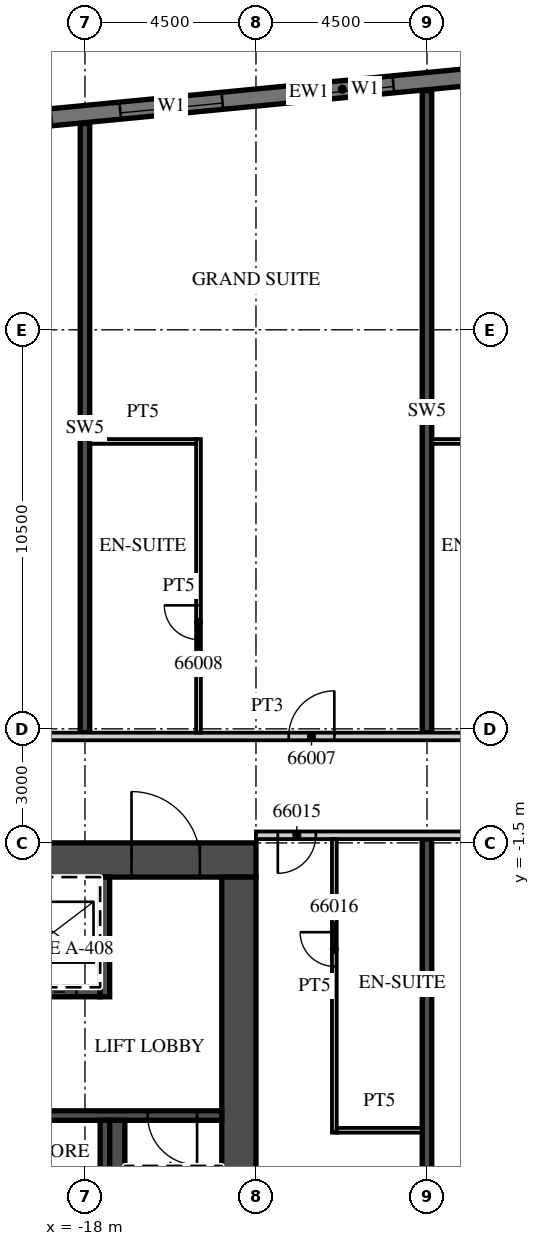
"""IFC4 building model, lengths in metres.
Left out: names, types, materials, properties, quantities, classifications, styles, units other than length and angle.
Written with IfcOpenShell. Run it as: python <this file> out.ifc"""

import sys

from ifc_helpers import new_model, si_unit, direction, frame, frame_2d, origin, place, context, subcontext, project, spatial, rectangle, extrude, element, fill, save


model = new_model("IFC4")
c1 = context("Model", 3, precision=1e-05, world=origin(), true_north=direction((0.0, 1.0)))
c2 = subcontext(c1, "Body", "Model", "MODEL_VIEW")
j1 = project(units=[si_unit("LENGTHUNIT", "METRE"), si_unit("PLANEANGLEUNIT", "RADIAN")], contexts=[c1])
p1 = place(None, origin())
s1 = spatial("IfcSite", under=j1, at=p1, CompositionType="ELEMENT")
p2 = place(p1, origin())
s2 = spatial("IfcBuilding", under=s1, at=p2, CompositionType="ELEMENT")
p3 = place(p2, frame((0.0, 0.0, 268.5)))
s3 = spatial("IfcBuildingStorey", under=s2, at=p3, CompositionType="ELEMENT", Elevation=268.5)
p4 = place(p3, frame((-18.0, 1.4, 0.0), z_axis=(0.0, 0.0, 1.0), x_axis=(0.0, 1.0, 0.0)))
e1 = element("IfcWall", 1, at=p4, inside=s3, PredefinedType="SHEAR", context=c2, shape_type="SweptSolid", body=[
    extrude(rectangle(XDim=16.03, YDim=0.25, at=frame_2d((8.015, 0.0))), origin(), (0.0, 0.0, 1.0), 3.3),
])
p5 = place(p3, frame((-9.0, -20.94, 0.0), z_axis=(0.0, 0.0, 1.0), x_axis=(0.0, 1.0, 0.0)))
e2 = element("IfcWall", 2, at=p5, inside=s3, PredefinedType="SHEAR", context=c2, shape_type="SweptSolid", body=[
    extrude(rectangle(XDim=19.541, YDim=0.25, at=frame_2d((9.77, 0.0))), origin(), (0.0, 0.0, 1.0), 3.3),
])
p6 = place(p3, frame((-9.0, 1.4, 0.0), z_axis=(0.0, 0.0, 1.0), x_axis=(0.0, 1.0, 0.0)))
e3 = element("IfcWall", 3, at=p6, inside=s3, PredefinedType="SHEAR", context=c2, shape_type="SweptSolid", body=[
    extrude(rectangle(XDim=16.896, YDim=0.25, at=frame_2d((8.448, 0.0))), origin(), (0.0, 0.0, 1.0), 3.3),
])
p7 = place(p3, frame((13.521, 20.713, 0.0), z_axis=(0.0, 0.0, 1.0), x_axis=(-0.995396277313, -0.095844932638, 0.0)))
e4 = element("IfcWall", 4, at=p7, inside=s3, PredefinedType="SOLIDWALL", context=c2, shape_type="SweptSolid", body=[
    extrude(rectangle(XDim=51.495, YDim=0.45, at=frame_2d((25.748, 0.0))), origin(), (0.0, 0.0, 1.0), 3.02),
])
p8 = place(p7, frame((0.91, 0.0, 0.45)))
e5 = element("IfcOpeningElement", 5, at=p8, cuts=e4, PredefinedType="OPENING", context=c2, shape_type="SweptSolid", body=[
    extrude(rectangle(XDim=2.7, YDim=2.25, at=frame_2d((1.35, 1.125))), frame((0.0, 0.235, 0.0), z_axis=(0.0, -1.0, 0.0), x_axis=(1.0, 0.0, 0.0)), (0.0, 0.0, 1.0), 0.47),
])
p9 = place(p7, frame((5.431, 0.0, 0.45)))
e6 = element("IfcOpeningElement", 6, at=p9, cuts=e4, PredefinedType="OPENING", context=c2, shape_type="SweptSolid", body=[
    extrude(rectangle(XDim=2.7, YDim=2.25, at=frame_2d((1.35, 1.125))), frame((0.0, 0.235, 0.0), z_axis=(0.0, -1.0, 0.0), x_axis=(1.0, 0.0, 0.0)), (0.0, 0.0, 1.0), 0.47),
])
p10 = place(p7, frame((9.952, 0.0, 0.45)))
e7 = element("IfcOpeningElement", 7, at=p10, cuts=e4, PredefinedType="OPENING", context=c2, shape_type="SweptSolid", body=[
    extrude(rectangle(XDim=2.7, YDim=2.25, at=frame_2d((1.35, 1.125))), frame((0.0, 0.235, 0.0), z_axis=(0.0, -1.0, 0.0), x_axis=(1.0, 0.0, 0.0)), (0.0, 0.0, 1.0), 0.47),
])
p11 = place(p7, frame((14.473, 0.0, 0.45)))
e8 = element("IfcOpeningElement", 8, at=p11, cuts=e4, PredefinedType="OPENING", context=c2, shape_type="SweptSolid", body=[
    extrude(rectangle(XDim=2.7, YDim=2.25, at=frame_2d((1.35, 1.125))), frame((0.0, 0.235, 0.0), z_axis=(0.0, -1.0, 0.0), x_axis=(1.0, 0.0, 0.0)), (0.0, 0.0, 1.0), 0.47),
])
p12 = place(p7, frame((18.994, 0.0, 0.45)))
e9 = element("IfcOpeningElement", 9, at=p12, cuts=e4, PredefinedType="OPENING", context=c2, shape_type="SweptSolid", body=[
    extrude(rectangle(XDim=2.7, YDim=2.25, at=frame_2d((1.35, 1.125))), frame((0.0, 0.235, 0.0), z_axis=(0.0, -1.0, 0.0), x_axis=(1.0, 0.0, 0.0)), (0.0, 0.0, 1.0), 0.47),
])
p13 = place(p7, frame((23.514, 0.0, 0.45)))
e10 = element("IfcOpeningElement", 10, at=p13, cuts=e4, PredefinedType="OPENING", context=c2, shape_type="SweptSolid", body=[
    extrude(rectangle(XDim=2.7, YDim=2.25, at=frame_2d((1.35, 1.125))), frame((0.0, 0.235, 0.0), z_axis=(0.0, -1.0, 0.0), x_axis=(1.0, 0.0, 0.0)), (0.0, 0.0, 1.0), 0.47),
])
p14 = place(p7, frame((28.035, 0.0, 0.45)))
e11 = element("IfcOpeningElement", 11, at=p14, cuts=e4, PredefinedType="OPENING", context=c2, shape_type="SweptSolid", body=[
    extrude(rectangle(XDim=2.7, YDim=2.25, at=frame_2d((1.35, 1.125))), frame((0.0, 0.235, 0.0), z_axis=(0.0, -1.0, 0.0), x_axis=(1.0, 0.0, 0.0)), (0.0, 0.0, 1.0), 0.47),
])
p15 = place(p7, frame((32.556, 0.0, 0.45)))
e12 = element("IfcOpeningElement", 12, at=p15, cuts=e4, PredefinedType="OPENING", context=c2, shape_type="SweptSolid", body=[
    extrude(rectangle(XDim=2.7, YDim=2.25, at=frame_2d((1.35, 1.125))), frame((0.0, 0.235, 0.0), z_axis=(0.0, -1.0, 0.0), x_axis=(1.0, 0.0, 0.0)), (0.0, 0.0, 1.0), 0.47),
])
p16 = place(p7, frame((37.077, 0.0, 0.45)))
e13 = element("IfcOpeningElement", 13, at=p16, cuts=e4, PredefinedType="OPENING", context=c2, shape_type="SweptSolid", body=[
    extrude(rectangle(XDim=2.7, YDim=2.25, at=frame_2d((1.35, 1.125))), frame((0.0, 0.235, 0.0), z_axis=(0.0, -1.0, 0.0), x_axis=(1.0, 0.0, 0.0)), (0.0, 0.0, 1.0), 0.47),
])
p17 = place(p7, frame((41.598, 0.0, 0.45)))
e14 = element("IfcOpeningElement", 14, at=p17, cuts=e4, PredefinedType="OPENING", context=c2, shape_type="SweptSolid", body=[
    extrude(rectangle(XDim=2.7, YDim=2.25, at=frame_2d((1.35, 1.125))), frame((0.0, 0.235, 0.0), z_axis=(0.0, -1.0, 0.0), x_axis=(1.0, 0.0, 0.0)), (0.0, 0.0, 1.0), 0.47),
])
p18 = place(p7, frame((46.118, 0.0, 0.45)))
e15 = element("IfcOpeningElement", 15, at=p18, cuts=e4, PredefinedType="OPENING", context=c2, shape_type="SweptSolid", body=[
    extrude(rectangle(XDim=2.7, YDim=2.25, at=frame_2d((1.35, 1.125))), frame((0.0, 0.235, 0.0), z_axis=(0.0, -1.0, 0.0), x_axis=(1.0, 0.0, 0.0)), (0.0, 0.0, 1.0), 0.47),
])
p19 = place(p3, frame((-39.909, 1.3, 0.0), z_axis=(0.0, 0.0, 1.0), x_axis=(1.0, 0.0, 0.0)))
e16 = element("IfcWall", 16, at=p19, inside=s3, PredefinedType="PARTITIONING", context=c2, shape_type="SweptSolid", body=[
    extrude(rectangle(XDim=53.409, YDim=0.2, at=frame_2d((26.705, 0.0))), origin(), (0.0, 0.0, 1.0), 3.02),
])
p20 = place(p19, frame((0.15, 0.0, 0.0)))
e17 = element("IfcOpeningElement", 17, at=p20, cuts=e16, PredefinedType="OPENING", context=c2, shape_type="SweptSolid", body=[
    extrude(rectangle(XDim=0.9, YDim=2.1, at=frame_2d((0.45, 1.05))), frame((0.0, 0.11, 0.0), z_axis=(0.0, -1.0, 0.0), x_axis=(1.0, 0.0, 0.0)), (0.0, 0.0, 1.0), 0.22),
])
p21 = place(p19, frame((9.271, 0.0, 0.0)))
e18 = element("IfcOpeningElement", 18, at=p21, cuts=e16, PredefinedType="OPENING", context=c2, shape_type="SweptSolid", body=[
    extrude(rectangle(XDim=1.2, YDim=2.1, at=frame_2d((0.6, 1.05))), frame((0.0, 0.11, 0.0), z_axis=(0.0, -1.0, 0.0), x_axis=(1.0, 0.0, 0.0)), (0.0, 0.0, 1.0), 0.22),
])
p22 = place(p19, frame((18.271, 0.0, 0.0)))
e19 = element("IfcOpeningElement", 19, at=p22, cuts=e16, PredefinedType="OPENING", context=c2, shape_type="SweptSolid", body=[
    extrude(rectangle(XDim=1.2, YDim=2.1, at=frame_2d((0.6, 1.05))), frame((0.0, 0.11, 0.0), z_axis=(0.0, -1.0, 0.0), x_axis=(1.0, 0.0, 0.0)), (0.0, 0.0, 1.0), 0.22),
])
p23 = place(p19, frame((27.271, 0.0, 0.0)))
e20 = element("IfcOpeningElement", 20, at=p23, cuts=e16, PredefinedType="OPENING", context=c2, shape_type="SweptSolid", body=[
    extrude(rectangle(XDim=1.2, YDim=2.1, at=frame_2d((0.6, 1.05))), frame((0.0, 0.11, 0.0), z_axis=(0.0, -1.0, 0.0), x_axis=(1.0, 0.0, 0.0)), (0.0, 0.0, 1.0), 0.22),
])
p24 = place(p19, frame((36.271, 0.0, 0.0)))
e21 = element("IfcOpeningElement", 21, at=p24, cuts=e16, PredefinedType="OPENING", context=c2, shape_type="SweptSolid", body=[
    extrude(rectangle(XDim=1.2, YDim=2.1, at=frame_2d((0.6, 1.05))), frame((0.0, 0.11, 0.0), z_axis=(0.0, -1.0, 0.0), x_axis=(1.0, 0.0, 0.0)), (0.0, 0.0, 1.0), 0.22),
])
p25 = place(p19, frame((42.346, 0.0, 0.0)))
e22 = element("IfcOpeningElement", 22, at=p25, cuts=e16, PredefinedType="OPENING", context=c2, shape_type="SweptSolid", body=[
    extrude(rectangle(XDim=1.2, YDim=2.1, at=frame_2d((0.6, 1.05))), frame((0.0, 0.11, 0.0), z_axis=(0.0, -1.0, 0.0), x_axis=(1.0, 0.0, 0.0)), (0.0, 0.0, 1.0), 0.22),
])
p26 = place(p19, frame((51.834, 0.0, 0.0)))
e23 = element("IfcOpeningElement", 23, at=p26, cuts=e16, PredefinedType="OPENING", context=c2, shape_type="SweptSolid", body=[
    extrude(rectangle(XDim=1.0, YDim=2.1, at=frame_2d((0.5, 1.05))), frame((0.0, 0.11, 0.0), z_axis=(0.0, -1.0, 0.0), x_axis=(1.0, 0.0, 0.0)), (0.0, 0.0, 1.0), 0.22),
])
p27 = place(p3, frame((-15.012, 1.4, 0.0), z_axis=(0.0, 0.0, 1.0), x_axis=(0.0, 1.0, 0.0)))
e24 = element("IfcWall", 24, at=p27, inside=s3, PredefinedType="PARTITIONING", context=c2, shape_type="SweptSolid", body=[
    extrude(rectangle(XDim=7.725, YDim=0.125, at=frame_2d((3.863, 0.0))), origin(), (0.0, 0.0, 1.0), 3.02),
])
p28 = place(p27, frame((2.45, 0.0, 0.0)))
e25 = element("IfcOpeningElement", 25, at=p28, cuts=e24, PredefinedType="OPENING", context=c2, shape_type="SweptSolid", body=[
    extrude(rectangle(XDim=0.9, YDim=2.1, at=frame_2d((0.45, 1.05))), frame((0.0, 0.073, 0.0), z_axis=(0.0, -1.0, 0.0), x_axis=(1.0, 0.0, 0.0)), (0.0, 0.0, 1.0), 0.145),
])
for number, where, z_axis, x_axis in (
    (26, (-17.875, 9.062, 0.0), (0.0, 0.0, 1.0), (1.0, 0.0, 0.0)),
    (27, (-8.875, 9.062, 0.0), (0.0, 0.0, 1.0), (1.0, 0.0, 0.0)),
):
    element("IfcWall", number, at=place(p3, frame(where, z_axis=z_axis, x_axis=x_axis)), inside=s3, PredefinedType="PARTITIONING", context=c2, shape_type="SweptSolid", body=[
        extrude(rectangle(XDim=2.8, YDim=0.125, at=frame_2d((1.4, 0.0))), origin(), (0.0, 0.0, 1.0), 3.02),
    ])
p29 = place(p3, frame((-13.5, -1.3, 0.0), z_axis=(0.0, 0.0, 1.0), x_axis=(1.0, 0.0, 0.0)))
e28 = element("IfcWall", 28, at=p29, inside=s3, PredefinedType="PARTITIONING", context=c2, shape_type="SweptSolid", body=[
    extrude(rectangle(XDim=50.293, YDim=0.2, at=frame_2d((25.146, 0.0))), origin(), (0.0, 0.0, 1.0), 3.02),
])
p30 = place(p29, frame((0.575, 0.0, 0.0)))
e29 = element("IfcOpeningElement", 29, at=p30, cuts=e28, PredefinedType="OPENING", context=c2, shape_type="SweptSolid", body=[
    extrude(rectangle(XDim=1.0, YDim=2.1, at=frame_2d((0.5, 1.05))), frame((0.0, 0.11, 0.0), z_axis=(0.0, -1.0, 0.0), x_axis=(1.0, 0.0, 0.0)), (0.0, 0.0, 1.0), 0.22),
])
p31 = place(p29, frame((6.938, 0.0, 0.0)))
e30 = element("IfcOpeningElement", 30, at=p31, cuts=e28, PredefinedType="OPENING", context=c2, shape_type="SweptSolid", body=[
    extrude(rectangle(XDim=1.2, YDim=2.1, at=frame_2d((0.6, 1.05))), frame((0.0, 0.11, 0.0), z_axis=(0.0, -1.0, 0.0), x_axis=(1.0, 0.0, 0.0)), (0.0, 0.0, 1.0), 0.22),
])
p32 = place(p29, frame((18.862, 0.0, 0.0)))
e31 = element("IfcOpeningElement", 31, at=p32, cuts=e28, PredefinedType="OPENING", context=c2, shape_type="SweptSolid", body=[
    extrude(rectangle(XDim=1.2, YDim=2.1, at=frame_2d((0.6, 1.05))), frame((0.0, 0.11, 0.0), z_axis=(0.0, -1.0, 0.0), x_axis=(1.0, 0.0, 0.0)), (0.0, 0.0, 1.0), 0.22),
])
p33 = place(p29, frame((24.938, 0.0, 0.0)))
e32 = element("IfcOpeningElement", 32, at=p33, cuts=e28, PredefinedType="OPENING", context=c2, shape_type="SweptSolid", body=[
    extrude(rectangle(XDim=1.2, YDim=2.1, at=frame_2d((0.6, 1.05))), frame((0.0, 0.11, 0.0), z_axis=(0.0, -1.0, 0.0), x_axis=(1.0, 0.0, 0.0)), (0.0, 0.0, 1.0), 0.22),
])
p34 = place(p29, frame((36.862, 0.0, 0.0)))
e33 = element("IfcOpeningElement", 33, at=p34, cuts=e28, PredefinedType="OPENING", context=c2, shape_type="SweptSolid", body=[
    extrude(rectangle(XDim=1.2, YDim=2.1, at=frame_2d((0.6, 1.05))), frame((0.0, 0.11, 0.0), z_axis=(0.0, -1.0, 0.0), x_axis=(1.0, 0.0, 0.0)), (0.0, 0.0, 1.0), 0.22),
])
p35 = place(p29, frame((43.45, 0.0, 0.0)))
e34 = element("IfcOpeningElement", 34, at=p35, cuts=e28, PredefinedType="OPENING", context=c2, shape_type="SweptSolid", body=[
    extrude(rectangle(XDim=1.0, YDim=2.1, at=frame_2d((0.5, 1.05))), frame((0.0, 0.11, 0.0), z_axis=(0.0, -1.0, 0.0), x_axis=(1.0, 0.0, 0.0)), (0.0, 0.0, 1.0), 0.22),
])
p36 = place(p29, frame((45.55, 0.0, 0.0)))
e35 = element("IfcOpeningElement", 35, at=p36, cuts=e28, PredefinedType="OPENING", context=c2, shape_type="SweptSolid", body=[
    extrude(rectangle(XDim=1.0, YDim=2.1, at=frame_2d((0.5, 1.05))), frame((0.0, 0.11, 0.0), z_axis=(0.0, -1.0, 0.0), x_axis=(1.0, 0.0, 0.0)), (0.0, 0.0, 1.0), 0.22),
])
p37 = place(p3, frame((-11.438, -9.125, 0.0), z_axis=(0.0, 0.0, 1.0), x_axis=(0.0, 1.0, 0.0)))
e36 = element("IfcWall", 36, at=p37, inside=s3, PredefinedType="PARTITIONING", context=c2, shape_type="SweptSolid", body=[
    extrude(rectangle(XDim=7.725, YDim=0.125, at=frame_2d((3.863, 0.0))), origin(), (0.0, 0.0, 1.0), 3.02),
])
p38 = place(p37, frame((4.375, 0.0, 0.0)))
e37 = element("IfcOpeningElement", 37, at=p38, cuts=e36, PredefinedType="OPENING", context=c2, shape_type="SweptSolid", body=[
    extrude(rectangle(XDim=0.9, YDim=2.1, at=frame_2d((0.45, 1.05))), frame((0.0, 0.073, 0.0), z_axis=(0.0, -1.0, 0.0), x_axis=(1.0, 0.0, 0.0)), (0.0, 0.0, 1.0), 0.145),
])
p39 = place(p3, frame((-11.375, -9.062, 0.0), z_axis=(0.0, 0.0, 1.0), x_axis=(1.0, 0.0, 0.0)))
e38 = element("IfcWall", 38, at=p39, inside=s3, PredefinedType="PARTITIONING", context=c2, shape_type="SweptSolid", body=[
    extrude(rectangle(XDim=2.25, YDim=0.125, at=frame_2d((1.125, 0.0))), origin(), (0.0, 0.0, 1.0), 3.02),
])
p40 = place(p3, frame((-31.5, -1.95, 0.0), z_axis=(0.0, 0.0, 1.0), x_axis=(1.0, 0.0, 0.0)))
e39 = element("IfcWall", 39, at=p40, inside=s3, PredefinedType="SHEAR", context=c2, shape_type="SweptSolid", body=[
    extrude(rectangle(XDim=18.0, YDim=0.9, at=frame_2d((9.0, 0.0))), origin(), (0.0, 0.0, 1.0), 3.02),
])
p41 = place(p40, frame((14.725, 0.0, 0.0)))
e40 = element("IfcOpeningElement", 40, at=p41, cuts=e39, PredefinedType="OPENING", context=c2, shape_type="SweptSolid", body=[
    extrude(rectangle(XDim=1.8, YDim=2.1, at=frame_2d((0.9, 1.05))), frame((0.0, 0.46, 0.0), z_axis=(0.0, -1.0, 0.0), x_axis=(1.0, 0.0, 0.0)), (0.0, 0.0, 1.0), 0.92),
])
p42 = place(p3, frame((-13.95, -14.6, 0.0), z_axis=(0.0, 0.0, 1.0), x_axis=(0.0, 1.0, 0.0)))
e41 = element("IfcWall", 41, at=p42, inside=s3, PredefinedType="SHEAR", context=c2, shape_type="SweptSolid", body=[
    extrude(rectangle(XDim=12.2, YDim=0.9, at=frame_2d((6.1, 0.0))), origin(), (0.0, 0.0, 1.0), 3.02),
])
p43 = place(p3, frame((-30.6, -5.425, 0.0), z_axis=(0.0, 0.0, 1.0), x_axis=(1.0, 0.0, 0.0)))
e42 = element("IfcWall", 42, at=p43, inside=s3, PredefinedType="SHEAR", context=c2, shape_type="SweptSolid", body=[
    extrude(rectangle(XDim=13.0, YDim=0.25, at=frame_2d((6.5, 0.0))), origin(), (0.0, 0.0, 1.0), 3.02),
])
p44 = place(p43, frame((8.525, 0.0, 0.0)))
e43 = element("IfcOpeningElement", 43, at=p44, cuts=e42, PredefinedType="OPENING", context=c2, shape_type="SweptSolid", body=[
    extrude(rectangle(XDim=1.2, YDim=2.1, at=frame_2d((0.6, 1.05))), frame((0.0, 0.135, 0.0), z_axis=(0.0, -1.0, 0.0), x_axis=(1.0, 0.0, 0.0)), (0.0, 0.0, 1.0), 0.27),
])
p45 = place(p43, frame((11.175, 0.0, 0.0)))
e44 = element("IfcOpeningElement", 44, at=p45, cuts=e42, PredefinedType="OPENING", context=c2, shape_type="SweptSolid", body=[
    extrude(rectangle(XDim=1.2, YDim=2.1, at=frame_2d((0.6, 1.05))), frame((0.0, 0.135, 0.0), z_axis=(0.0, -1.0, 0.0), x_axis=(1.0, 0.0, 0.0)), (0.0, 0.0, 1.0), 0.27),
])
p46 = place(p43, frame((4.725, 0.0, 0.0)))
e45 = element("IfcOpeningElement", 45, at=p46, cuts=e42, PredefinedType="OPENING", context=c2, shape_type="SweptSolid", body=[
    extrude(rectangle(XDim=1.0, YDim=2.1, at=frame_2d((0.5, 1.05))), frame((0.0, 0.135, 0.0), z_axis=(0.0, -1.0, 0.0), x_axis=(1.0, 0.0, 0.0)), (0.0, 0.0, 1.0), 0.27),
])
p47 = place(p3, frame((-17.475, -5.55, 0.0), z_axis=(0.0, 0.0, 1.0), x_axis=(0.0, 1.0, 0.0)))
e46 = element("IfcWall", 46, at=p47, inside=s3, PredefinedType="SHEAR", context=c2, shape_type="SweptSolid", body=[
    extrude(rectangle(XDim=3.15, YDim=0.25, at=frame_2d((1.575, 0.0))), origin(), (0.0, 0.0, 1.0), 3.02),
])
p48 = place(p3, frame((-30.6, -8.675, 0.0), z_axis=(0.0, 0.0, 1.0), x_axis=(1.0, 0.0, 0.0)))
e47 = element("IfcWall", 47, at=p48, inside=s3, PredefinedType="SHEAR", context=c2, shape_type="SweptSolid", body=[
    extrude(rectangle(XDim=16.2, YDim=0.25, at=frame_2d((8.1, 0.0))), origin(), (0.0, 0.0, 1.0), 3.02),
])
p49 = place(p48, frame((14.25, 0.0, 0.0)))
e48 = element("IfcOpeningElement", 48, at=p49, cuts=e47, PredefinedType="OPENING", context=c2, shape_type="SweptSolid", body=[
    extrude(rectangle(XDim=1.3, YDim=2.1, at=frame_2d((0.65, 1.05))), frame((0.0, 0.135, 0.0), z_axis=(0.0, -1.0, 0.0), x_axis=(1.0, 0.0, 0.0)), (0.0, 0.0, 1.0), 0.27),
])
p50 = place(p48, frame((1.688, 0.0, 0.0)))
e49 = element("IfcOpeningElement", 49, at=p50, cuts=e47, PredefinedType="OPENING", context=c2, shape_type="SweptSolid", body=[
    extrude(rectangle(XDim=1.0, YDim=2.1, at=frame_2d((0.5, 1.05))), frame((0.0, 0.135, 0.0), z_axis=(0.0, -1.0, 0.0), x_axis=(1.0, 0.0, 0.0)), (0.0, 0.0, 1.0), 0.27),
])
p51 = place(p48, frame((5.7, 0.0, 0.0)))
e50 = element("IfcOpeningElement", 50, at=p51, cuts=e47, PredefinedType="OPENING", context=c2, shape_type="SweptSolid", body=[
    extrude(rectangle(XDim=1.0, YDim=2.1, at=frame_2d((0.5, 1.05))), frame((0.0, 0.135, 0.0), z_axis=(0.0, -1.0, 0.0), x_axis=(1.0, 0.0, 0.0)), (0.0, 0.0, 1.0), 0.27),
])
p52 = place(p48, frame((10.137, 0.0, 0.0)))
e51 = element("IfcOpeningElement", 51, at=p52, cuts=e47, PredefinedType="OPENING", context=c2, shape_type="SweptSolid", body=[
    extrude(rectangle(XDim=1.0, YDim=2.1, at=frame_2d((0.5, 1.05))), frame((0.0, 0.135, 0.0), z_axis=(0.0, -1.0, 0.0), x_axis=(1.0, 0.0, 0.0)), (0.0, 0.0, 1.0), 0.27),
])
p53 = place(p3, frame((-17.475, -11.7, 0.0), z_axis=(0.0, 0.0, 1.0), x_axis=(0.0, 1.0, 0.0)))
e52 = element("IfcWall", 52, at=p53, inside=s3, PredefinedType="SHEAR", context=c2, shape_type="SweptSolid", body=[
    extrude(rectangle(XDim=2.9, YDim=0.25, at=frame_2d((1.45, 0.0))), origin(), (0.0, 0.0, 1.0), 3.02),
])
p54 = place(p3, frame((-17.15, -14.6, 0.0), z_axis=(0.0, 0.0, 1.0), x_axis=(0.0, 1.0, 0.0)))
e53 = element("IfcWall", 53, at=p54, inside=s3, PredefinedType="SHEAR", context=c2, shape_type="SweptSolid", body=[
    extrude(rectangle(XDim=5.8, YDim=0.4, at=frame_2d((2.9, 0.0))), origin(), (0.0, 0.0, 1.0), 3.02),
])
p55 = place(p13, origin())
e54 = element("IfcWindow", 54, at=p55, inside=s3, PartitioningType="SINGLE_PANEL", PredefinedType="WINDOW", context=c2, shape_type="SweptSolid", body=[
    extrude(rectangle(XDim=2.7, YDim=2.25, at=frame_2d((1.35, 1.125))), frame((0.0, 0.09, 0.0), z_axis=(0.0, -1.0, 0.0), x_axis=(1.0, 0.0, 0.0)), (0.0, 0.0, 1.0), 0.06),
])
fill(e10, e54)
p56 = place(p14, origin())
e55 = element("IfcWindow", 55, at=p56, inside=s3, PartitioningType="SINGLE_PANEL", PredefinedType="WINDOW", context=c2, shape_type="SweptSolid", body=[
    extrude(rectangle(XDim=2.7, YDim=2.25, at=frame_2d((1.35, 1.125))), frame((0.0, 0.09, 0.0), z_axis=(0.0, -1.0, 0.0), x_axis=(1.0, 0.0, 0.0)), (0.0, 0.0, 1.0), 0.06),
])
fill(e11, e55)
p57 = place(p23, origin())
e56 = element("IfcDoor", 56, at=p57, inside=s3, OperationType="SINGLE_SWING_RIGHT", PredefinedType="DOOR", context=c2, shape_type="SweptSolid", body=[
    extrude(rectangle(XDim=1.2, YDim=2.1, at=frame_2d((0.6, 1.05))), frame((0.0, 0.025, 0.0), z_axis=(0.0, -1.0, 0.0), x_axis=(1.0, 0.0, 0.0)), (0.0, 0.0, 1.0), 0.05),
])
fill(e20, e56)
p58 = place(p28, origin())
e57 = element("IfcDoor", 57, at=p58, inside=s3, OperationType="SINGLE_SWING_RIGHT", PredefinedType="DOOR", context=c2, shape_type="SweptSolid", body=[
    extrude(rectangle(XDim=0.9, YDim=2.1, at=frame_2d((0.45, 1.05))), frame((0.0, 0.025, 0.0), z_axis=(0.0, -1.0, 0.0), x_axis=(1.0, 0.0, 0.0)), (0.0, 0.0, 1.0), 0.05),
])
fill(e25, e57)
p59 = place(p30, origin())
e58 = element("IfcDoor", 58, at=p59, inside=s3, OperationType="SINGLE_SWING_LEFT", PredefinedType="DOOR", context=c2, shape_type="SweptSolid", body=[
    extrude(rectangle(XDim=1.0, YDim=2.1, at=frame_2d((0.5, 1.05))), frame((0.0, 0.025, 0.0), z_axis=(0.0, -1.0, 0.0), x_axis=(1.0, 0.0, 0.0)), (0.0, 0.0, 1.0), 0.05),
])
fill(e29, e58)
p60 = place(p38, origin())
e59 = element("IfcDoor", 59, at=p60, inside=s3, OperationType="SINGLE_SWING_RIGHT", PredefinedType="DOOR", context=c2, shape_type="SweptSolid", body=[
    extrude(rectangle(XDim=0.9, YDim=2.1, at=frame_2d((0.45, 1.05))), frame((0.0, 0.025, 0.0), z_axis=(0.0, -1.0, 0.0), x_axis=(1.0, 0.0, 0.0)), (0.0, 0.0, 1.0), 0.05),
])
fill(e37, e59)
p61 = place(p45, origin())
e60 = element("IfcDoor", 60, at=p61, inside=s3, OperationType="SLIDING_TO_RIGHT", PredefinedType="DOOR", context=c2, shape_type="SweptSolid", body=[
    extrude(rectangle(XDim=1.2, YDim=2.1, at=frame_2d((0.6, 1.05))), frame((0.0, 0.025, 0.0), z_axis=(0.0, -1.0, 0.0), x_axis=(1.0, 0.0, 0.0)), (0.0, 0.0, 1.0), 0.05),
])
fill(e44, e60)
p62 = place(p41, origin())
e61 = element("IfcDoor", 61, at=p62, inside=s3, OperationType="DOUBLE_DOOR_DOUBLE_SWING", PredefinedType="DOOR", context=c2, shape_type="SweptSolid", body=[
    extrude(rectangle(XDim=1.8, YDim=2.1, at=frame_2d((0.9, 1.05))), frame((0.0, 0.025, 0.0), z_axis=(0.0, -1.0, 0.0), x_axis=(1.0, 0.0, 0.0)), (0.0, 0.0, 1.0), 0.05),
])
fill(e40, e61)
p63 = place(p49, origin())
e62 = element("IfcDoor", 62, at=p63, inside=s3, OperationType="SINGLE_SWING_RIGHT", PredefinedType="DOOR", context=c2, shape_type="SweptSolid", body=[
    extrude(rectangle(XDim=1.3, YDim=2.1, at=frame_2d((0.65, 1.05))), frame((0.0, 0.025, 0.0), z_axis=(0.0, -1.0, 0.0), x_axis=(1.0, 0.0, 0.0)), (0.0, 0.0, 1.0), 0.05),
])
fill(e48, e62)
save(model, sys.argv[1])
